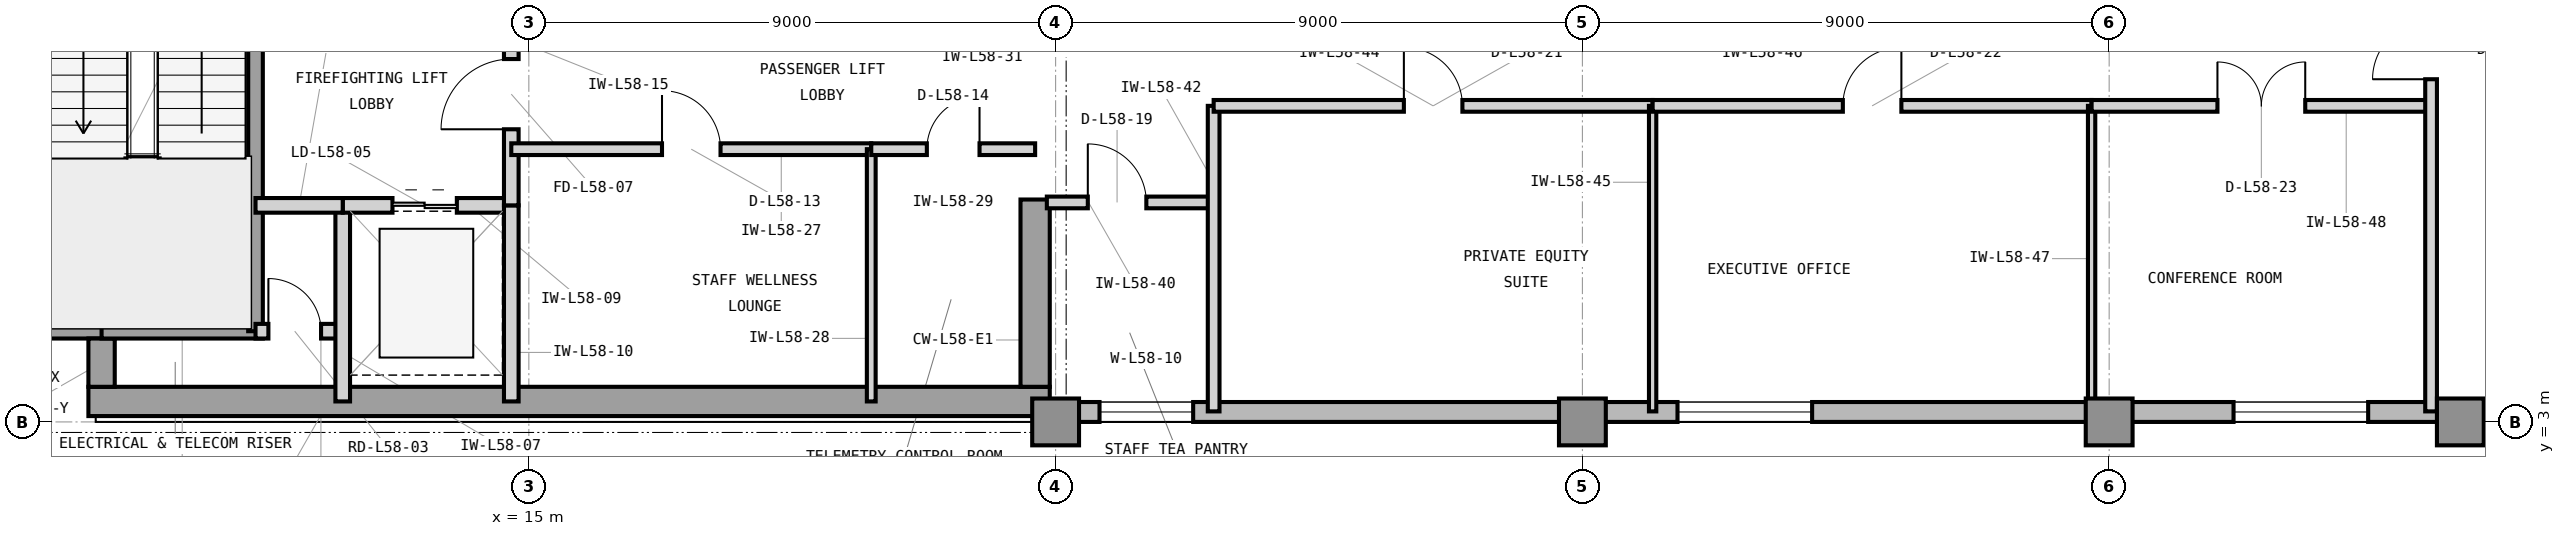
"""IFC4 building model, lengths in metres.
Left out: names, types, materials, properties, quantities, classifications, styles, units other than length and angle.
Written with IfcOpenShell. Run it as: python <this file> out.ifc"""

import sys

from ifc_helpers import new_model, si_unit, direction, frame, frame_2d, origin, origin_2d, place, context, subcontext, project, spatial, rectangle, extrude, element, fill, save


model = new_model("IFC4")
c1 = context("Model", 3, precision=1e-05, world=origin(), true_north=direction((0.0, 1.0)))
c2 = subcontext(c1, "Body", "Model", "MODEL_VIEW")
j1 = project(units=[si_unit("LENGTHUNIT", "METRE"), si_unit("PLANEANGLEUNIT", "RADIAN")], contexts=[c1])
p1 = place(None, origin())
s1 = spatial("IfcSite", under=j1, at=p1, CompositionType="ELEMENT")
p2 = place(p1, origin())
s2 = spatial("IfcBuilding", under=s1, at=p2, CompositionType="ELEMENT")
p3 = place(p2, frame((0.0, 0.0, 239.1)))
s3 = spatial("IfcBuildingStorey", under=s2, at=p3, CompositionType="ELEMENT", Elevation=239.1)
p4 = place(p3, frame((7.475, 3.35, 0.0), z_axis=(0.0, 0.0, 1.0), x_axis=(1.0, 0.0, 0.0)))
e1 = element("IfcWall", 1, at=p4, inside=s3, PredefinedType="SHEAR", context=c2, shape_type="SweptSolid", body=[
    extrude(rectangle(XDim=16.425, YDim=0.5, at=frame_2d((8.212, 0.0))), origin(), (0.0, 0.0, 1.0), 3.9),
])
p5 = place(p3, frame((23.65, 3.6, 0.0), z_axis=(0.0, 0.0, 1.0), x_axis=(0.0, 1.0, 0.0)))
e2 = element("IfcWall", 2, at=p5, inside=s3, PredefinedType="SHEAR", context=c2, shape_type="SweptSolid", body=[
    extrude(rectangle(XDim=3.2, YDim=0.5, at=frame_2d((1.6, 0.0))), origin(), (0.0, 0.0, 1.0), 3.9),
])
p6 = place(p3, frame((6.6, 4.65, 0.0), z_axis=(0.0, 0.0, 1.0), x_axis=(1.0, 0.0, 0.0)))
e3 = element("IfcWall", 3, at=p6, inside=s3, PredefinedType="SHEAR", context=c2, shape_type="SweptSolid", body=[
    extrude(rectangle(XDim=1.325, YDim=0.45, at=frame_2d((0.663, 0.0))), origin(), (0.0, 0.0, 1.0), 3.9),
])
p7 = place(p3, frame((7.7, 3.6, 0.0), z_axis=(0.0, 0.0, 1.0), x_axis=(0.0, 1.0, 0.0)))
e4 = element("IfcWall", 4, at=p7, inside=s3, PredefinedType="SHEAR", context=c2, shape_type="SweptSolid", body=[
    extrude(rectangle(XDim=0.825, YDim=0.45, at=frame_2d((0.413, 0.0))), origin(), (0.0, 0.0, 1.0), 3.9),
])
for number, where, z_axis, x_axis in (
    (5, (24.0, 3.0, 0.0), (0.0, 0.0, 1.0), (1.0, 0.0, 0.0)),
    (6, (33.0, 3.0, 0.0), (0.0, 0.0, 1.0), (1.0, 0.0, 0.0)),
    (7, (42.0, 3.0, 0.0), (0.0, 0.0, 1.0), (1.0, 0.0, 0.0)),
    (8, (48.0, 3.0, 0.0), (0.0, 0.0, 1.0), (1.0, 0.0, 0.0)),
):
    element("IfcColumn", number, at=place(p3, frame(where, z_axis=z_axis, x_axis=x_axis)), inside=s3, PredefinedType="COLUMN", context=c2, shape_type="SweptSolid", body=[
        extrude(rectangle(XDim=0.8, YDim=0.8, at=origin_2d()), origin(), (0.0, 0.0, 1.0), 3.9),
    ])
p8 = place(p3, frame((23.9, 3.17, 0.0), z_axis=(0.0, 0.0, 1.0), x_axis=(1.0, 0.0, 0.0)))
e9 = element("IfcWall", 9, at=p8, inside=s3, PredefinedType="STANDARD", context=c2, shape_type="SweptSolid", body=[
    extrude(rectangle(XDim=28.5, YDim=0.34, at=frame_2d((14.25, 0.0))), origin(), (0.0, 0.0, 1.0), 3.7),
])
p9 = place(p8, frame((10.725, 0.0, 0.9)))
e10 = element("IfcOpeningElement", 10, at=p9, cuts=e9, PredefinedType="OPENING", context=c2, shape_type="SweptSolid", body=[
    extrude(rectangle(XDim=2.3, YDim=2.2, at=frame_2d((1.15, 1.1))), frame((0.0, 0.18, 0.0), z_axis=(0.0, -1.0, 0.0), x_axis=(1.0, 0.0, 0.0)), (0.0, 0.0, 1.0), 0.36),
])
p10 = place(p8, frame((20.225, 0.0, 0.9)))
e11 = element("IfcOpeningElement", 11, at=p10, cuts=e9, PredefinedType="OPENING", context=c2, shape_type="SweptSolid", body=[
    extrude(rectangle(XDim=2.3, YDim=2.2, at=frame_2d((1.15, 1.1))), frame((0.0, 0.18, 0.0), z_axis=(0.0, -1.0, 0.0), x_axis=(1.0, 0.0, 0.0)), (0.0, 0.0, 1.0), 0.36),
])
p11 = place(p8, frame((0.85, 0.0, 0.9)))
e12 = element("IfcOpeningElement", 12, at=p11, cuts=e9, PredefinedType="OPENING", context=c2, shape_type="SweptSolid", body=[
    extrude(rectangle(XDim=1.6, YDim=2.2, at=frame_2d((0.8, 1.1))), frame((0.0, 0.18, 0.0), z_axis=(0.0, -1.0, 0.0), x_axis=(1.0, 0.0, 0.0)), (0.0, 0.0, 1.0), 0.36),
])
p12 = place(p3, frame((7.7, 4.55, 0.0), z_axis=(0.0, 0.0, 1.0), x_axis=(1.0, 0.0, 0.0)))
e13 = element("IfcWall", 13, at=p12, inside=s3, PredefinedType="SHEAR", context=c2, shape_type="SweptSolid", body=[
    extrude(rectangle(XDim=2.755, YDim=0.25, at=frame_2d((1.377, 0.0))), origin(), (0.0, 0.0, 1.0), 3.9),
])
p13 = place(p3, frame((10.33, 4.55, 0.0), z_axis=(0.0, 0.0, 1.0), x_axis=(0.0, 1.0, 0.0)))
e14 = element("IfcWall", 14, at=p13, inside=s3, PredefinedType="SHEAR", context=c2, shape_type="SweptSolid", body=[
    extrude(rectangle(XDim=7.45, YDim=0.25, at=frame_2d((3.725, 0.0))), origin(), (0.0, 0.0, 1.0), 3.9),
])
p14 = place(p13, frame((5.9, 0.0, 0.0)))
e15 = element("IfcOpeningElement", 15, at=p14, cuts=e14, PredefinedType="OPENING", context=c2, shape_type="SweptSolid", body=[
    extrude(rectangle(XDim=1.25, YDim=2.2, at=frame_2d((0.625, 1.1))), frame((0.0, 0.135, 0.0), z_axis=(0.0, -1.0, 0.0), x_axis=(1.0, 0.0, 0.0)), (0.0, 0.0, 1.0), 0.27),
])
p15 = place(p3, frame((10.33, 4.55, 0.0), z_axis=(0.0, 0.0, 1.0), x_axis=(1.0, 0.0, 0.0)))
e16 = element("IfcWall", 16, at=p15, inside=s3, PredefinedType="PARTITIONING", context=c2, shape_type="SweptSolid", body=[
    extrude(rectangle(XDim=1.49, YDim=0.25, at=frame_2d((0.745, 0.0))), origin(), (0.0, 0.0, 1.0), 3.69),
])
p16 = place(p15, frame((0.22, 0.0, 0.0)))
e17 = element("IfcOpeningElement", 17, at=p16, cuts=e16, PredefinedType="OPENING", context=c2, shape_type="SweptSolid", body=[
    extrude(rectangle(XDim=0.9, YDim=2.1, at=frame_2d((0.45, 1.05))), frame((0.0, 0.135, 0.0), z_axis=(0.0, -1.0, 0.0), x_axis=(1.0, 0.0, 0.0)), (0.0, 0.0, 1.0), 0.27),
])
p17 = place(p3, frame((11.82, 3.35, 0.0), z_axis=(0.0, 0.0, 1.0), x_axis=(0.0, 1.0, 0.0)))
e18 = element("IfcWall", 18, at=p17, inside=s3, PredefinedType="PARTITIONING", context=c2, shape_type="SweptSolid", body=[
    extrude(rectangle(XDim=3.35, YDim=0.25, at=frame_2d((1.675, 0.0))), origin(), (0.0, 0.0, 1.0), 3.69),
])
p18 = place(p3, frame((11.82, 6.7, 0.0), z_axis=(0.0, 0.0, 1.0), x_axis=(1.0, 0.0, 0.0)))
e19 = element("IfcWall", 19, at=p18, inside=s3, PredefinedType="PARTITIONING", context=c2, shape_type="SweptSolid", body=[
    extrude(rectangle(XDim=2.88, YDim=0.25, at=frame_2d((1.44, 0.0))), origin(), (0.0, 0.0, 1.0), 3.073),
])
p19 = place(p18, frame((0.85, 0.0, 0.0)))
e20 = element("IfcOpeningElement", 20, at=p19, cuts=e19, PredefinedType="OPENING", context=c2, shape_type="SweptSolid", body=[
    extrude(rectangle(XDim=1.1, YDim=2.25, at=frame_2d((0.55, 1.125))), frame((0.0, 0.135, 0.0), z_axis=(0.0, -1.0, 0.0), x_axis=(1.0, 0.0, 0.0)), (0.0, 0.0, 1.0), 0.27),
])
p20 = place(p3, frame((14.7, 3.35, 0.0), z_axis=(0.0, 0.0, 1.0), x_axis=(0.0, 1.0, 0.0)))
e21 = element("IfcWall", 21, at=p20, inside=s3, PredefinedType="PARTITIONING", context=c2, shape_type="SweptSolid", body=[
    extrude(rectangle(XDim=3.35, YDim=0.25, at=frame_2d((1.675, 0.0))), origin(), (0.0, 0.0, 1.0), 3.69),
])
p21 = place(p3, frame((14.7, 6.7, 0.0), z_axis=(0.0, 0.0, 1.0), x_axis=(0.0, 1.0, 0.0)))
e22 = element("IfcWall", 22, at=p21, inside=s3, PredefinedType="PARTITIONING", context=c2, shape_type="SweptSolid", body=[
    extrude(rectangle(XDim=3.8, YDim=0.25, at=frame_2d((1.9, 0.0))), origin(), (0.0, 0.0, 1.0), 3.69),
])
p22 = place(p21, frame((1.3, 0.0, 0.0)))
e23 = element("IfcOpeningElement", 23, at=p22, cuts=e22, PredefinedType="OPENING", context=c2, shape_type="SweptSolid", body=[
    extrude(rectangle(XDim=1.2, YDim=2.2, at=frame_2d((0.6, 1.1))), frame((0.0, 0.135, 0.0), z_axis=(0.0, -1.0, 0.0), x_axis=(1.0, 0.0, 0.0)), (0.0, 0.0, 1.0), 0.27),
])
p23 = place(p3, frame((10.33, 6.7, 0.0), z_axis=(0.0, 0.0, 1.0), x_axis=(1.0, 0.0, 0.0)))
e24 = element("IfcWall", 24, at=p23, inside=s3, PredefinedType="PARTITIONING", context=c2, shape_type="SweptSolid", body=[
    extrude(rectangle(XDim=1.49, YDim=0.25, at=frame_2d((0.745, 0.0))), origin(), (0.0, 0.0, 1.0), 3.073),
])
p24 = place(p3, frame((14.7, 7.66, 0.0), z_axis=(0.0, 0.0, 1.0), x_axis=(1.0, 0.0, 0.0)))
e25 = element("IfcWall", 25, at=p24, inside=s3, PredefinedType="PARTITIONING", context=c2, shape_type="SweptSolid", body=[
    extrude(rectangle(XDim=6.15, YDim=0.2, at=frame_2d((3.075, 0.0))), origin(), (0.0, 0.0, 1.0), 3.69),
])
p25 = place(p24, frame((2.575, 0.0, 0.0)))
e26 = element("IfcOpeningElement", 26, at=p25, cuts=e25, PredefinedType="OPENING", context=c2, shape_type="SweptSolid", body=[
    extrude(rectangle(XDim=1.0, YDim=2.15, at=frame_2d((0.5, 1.075))), frame((0.0, 0.11, 0.0), z_axis=(0.0, -1.0, 0.0), x_axis=(1.0, 0.0, 0.0)), (0.0, 0.0, 1.0), 0.22),
])
p26 = place(p3, frame((20.85, 3.35, 0.0), z_axis=(0.0, 0.0, 1.0), x_axis=(0.0, 1.0, 0.0)))
e27 = element("IfcWall", 27, at=p26, inside=s3, PredefinedType="PARTITIONING", context=c2, shape_type="SweptSolid", body=[
    extrude(rectangle(XDim=4.31, YDim=0.15, at=frame_2d((2.155, 0.0))), origin(), (0.0, 0.0, 1.0), 3.69),
])
p27 = place(p3, frame((20.85, 7.66, 0.0), z_axis=(0.0, 0.0, 1.0), x_axis=(1.0, 0.0, 0.0)))
e28 = element("IfcWall", 28, at=p27, inside=s3, PredefinedType="PARTITIONING", context=c2, shape_type="SweptSolid", body=[
    extrude(rectangle(XDim=2.8, YDim=0.2, at=frame_2d((1.4, 0.0))), origin(), (0.0, 0.0, 1.0), 3.69),
])
p28 = place(p27, frame((0.95, 0.0, 0.0)))
e29 = element("IfcOpeningElement", 29, at=p28, cuts=e28, PredefinedType="OPENING", context=c2, shape_type="SweptSolid", body=[
    extrude(rectangle(XDim=0.9, YDim=2.1, at=frame_2d((0.45, 1.05))), frame((0.0, 0.11, 0.0), z_axis=(0.0, -1.0, 0.0), x_axis=(1.0, 0.0, 0.0)), (0.0, 0.0, 1.0), 0.22),
])
p29 = place(p3, frame((23.85, 6.75, 0.0), z_axis=(0.0, 0.0, 1.0), x_axis=(1.0, 0.0, 0.0)))
e30 = element("IfcWall", 30, at=p29, inside=s3, PredefinedType="PARTITIONING", context=c2, shape_type="SweptSolid", body=[
    extrude(rectangle(XDim=2.85, YDim=0.2, at=frame_2d((1.425, 0.0))), origin(), (0.0, 0.0, 1.0), 3.69),
])
p30 = place(p29, frame((0.7, 0.0, 0.0)))
e31 = element("IfcOpeningElement", 31, at=p30, cuts=e30, PredefinedType="OPENING", context=c2, shape_type="SweptSolid", body=[
    extrude(rectangle(XDim=1.0, YDim=2.15, at=frame_2d((0.5, 1.075))), frame((0.0, 0.11, 0.0), z_axis=(0.0, -1.0, 0.0), x_axis=(1.0, 0.0, 0.0)), (0.0, 0.0, 1.0), 0.22),
])
p31 = place(p3, frame((26.7, 3.18, 0.0), z_axis=(0.0, 0.0, 1.0), x_axis=(0.0, 1.0, 0.0)))
e32 = element("IfcWall", 32, at=p31, inside=s3, PredefinedType="PARTITIONING", context=c2, shape_type="SweptSolid", body=[
    extrude(rectangle(XDim=5.22, YDim=0.2, at=frame_2d((2.61, 0.0))), origin(), (0.0, 0.0, 1.0), 3.69),
])
p32 = place(p3, frame((26.7, 8.4, 0.0), z_axis=(0.0, 0.0, 1.0), x_axis=(1.0, 0.0, 0.0)))
e33 = element("IfcWall", 33, at=p32, inside=s3, PredefinedType="PARTITIONING", context=c2, shape_type="SweptSolid", body=[
    extrude(rectangle(XDim=7.5, YDim=0.2, at=frame_2d((3.75, 0.0))), origin(), (0.0, 0.0, 1.0), 3.69),
])
p33 = place(p32, frame((3.25, 0.0, 0.0)))
e34 = element("IfcOpeningElement", 34, at=p33, cuts=e33, PredefinedType="OPENING", context=c2, shape_type="SweptSolid", body=[
    extrude(rectangle(XDim=1.0, YDim=2.15, at=frame_2d((0.5, 1.075))), frame((0.0, 0.11, 0.0), z_axis=(0.0, -1.0, 0.0), x_axis=(1.0, 0.0, 0.0)), (0.0, 0.0, 1.0), 0.22),
])
p34 = place(p3, frame((34.2, 3.18, 0.0), z_axis=(0.0, 0.0, 1.0), x_axis=(0.0, 1.0, 0.0)))
e35 = element("IfcWall", 35, at=p34, inside=s3, PredefinedType="PARTITIONING", context=c2, shape_type="SweptSolid", body=[
    extrude(rectangle(XDim=5.22, YDim=0.125, at=frame_2d((2.61, 0.0))), origin(), (0.0, 0.0, 1.0), 3.69),
])
p35 = place(p3, frame((34.2, 8.4, 0.0), z_axis=(0.0, 0.0, 1.0), x_axis=(1.0, 0.0, 0.0)))
e36 = element("IfcWall", 36, at=p35, inside=s3, PredefinedType="PARTITIONING", context=c2, shape_type="SweptSolid", body=[
    extrude(rectangle(XDim=7.5, YDim=0.2, at=frame_2d((3.75, 0.0))), origin(), (0.0, 0.0, 1.0), 3.69),
])
p36 = place(p35, frame((3.25, 0.0, 0.0)))
e37 = element("IfcOpeningElement", 37, at=p36, cuts=e36, PredefinedType="OPENING", context=c2, shape_type="SweptSolid", body=[
    extrude(rectangle(XDim=1.0, YDim=2.15, at=frame_2d((0.5, 1.075))), frame((0.0, 0.11, 0.0), z_axis=(0.0, -1.0, 0.0), x_axis=(1.0, 0.0, 0.0)), (0.0, 0.0, 1.0), 0.22),
])
p37 = place(p3, frame((41.7, 3.18, 0.0), z_axis=(0.0, 0.0, 1.0), x_axis=(0.0, 1.0, 0.0)))
e38 = element("IfcWall", 38, at=p37, inside=s3, PredefinedType="PARTITIONING", context=c2, shape_type="SweptSolid", body=[
    extrude(rectangle(XDim=5.22, YDim=0.125, at=frame_2d((2.61, 0.0))), origin(), (0.0, 0.0, 1.0), 3.69),
])
p38 = place(p3, frame((41.7, 8.4, 0.0), z_axis=(0.0, 0.0, 1.0), x_axis=(1.0, 0.0, 0.0)))
e39 = element("IfcWall", 39, at=p38, inside=s3, PredefinedType="PARTITIONING", context=c2, shape_type="SweptSolid", body=[
    extrude(rectangle(XDim=5.8, YDim=0.2, at=frame_2d((2.9, 0.0))), origin(), (0.0, 0.0, 1.0), 3.69),
])
p39 = place(p38, frame((2.15, 0.0, 0.0)))
e40 = element("IfcOpeningElement", 40, at=p39, cuts=e39, PredefinedType="OPENING", context=c2, shape_type="SweptSolid", body=[
    extrude(rectangle(XDim=1.5, YDim=2.3, at=frame_2d((0.75, 1.15))), frame((0.0, 0.11, 0.0), z_axis=(0.0, -1.0, 0.0), x_axis=(1.0, 0.0, 0.0)), (0.0, 0.0, 1.0), 0.22),
])
p40 = place(p3, frame((47.5, 3.18, 0.0), z_axis=(0.0, 0.0, 1.0), x_axis=(0.0, 1.0, 0.0)))
e41 = element("IfcWall", 41, at=p40, inside=s3, PredefinedType="PARTITIONING", context=c2, shape_type="SweptSolid", body=[
    extrude(rectangle(XDim=17.64, YDim=0.2, at=frame_2d((8.82, 0.0))), origin(), (0.0, 0.0, 1.0), 3.69),
])
p41 = place(p40, frame((5.675, 0.0, 0.0)))
e42 = element("IfcOpeningElement", 42, at=p41, cuts=e41, PredefinedType="OPENING", context=c2, shape_type="SweptSolid", body=[
    extrude(rectangle(XDim=1.0, YDim=2.15, at=frame_2d((0.5, 1.075))), frame((0.0, 0.11, 0.0), z_axis=(0.0, -1.0, 0.0), x_axis=(1.0, 0.0, 0.0)), (0.0, 0.0, 1.0), 0.22),
])
p42 = place(p9, origin())
e43 = element("IfcWindow", 43, at=p42, inside=s3, PartitioningType="SINGLE_PANEL", PredefinedType="WINDOW", context=c2, shape_type="SweptSolid", body=[
    extrude(rectangle(XDim=2.3, YDim=2.2, at=frame_2d((1.15, 1.1))), frame((0.0, 0.11, 0.0), z_axis=(0.0, -1.0, 0.0), x_axis=(1.0, 0.0, 0.0)), (0.0, 0.0, 1.0), 0.06),
])
fill(e10, e43)
p43 = place(p10, origin())
e44 = element("IfcWindow", 44, at=p43, inside=s3, PartitioningType="SINGLE_PANEL", PredefinedType="WINDOW", context=c2, shape_type="SweptSolid", body=[
    extrude(rectangle(XDim=2.3, YDim=2.2, at=frame_2d((1.15, 1.1))), frame((0.0, 0.11, 0.0), z_axis=(0.0, -1.0, 0.0), x_axis=(1.0, 0.0, 0.0)), (0.0, 0.0, 1.0), 0.06),
])
fill(e11, e44)
p44 = place(p16, origin())
e45 = element("IfcDoor", 45, at=p44, inside=s3, OperationType="SINGLE_SWING_LEFT", PredefinedType="TRAPDOOR", context=c2, shape_type="SweptSolid", body=[
    extrude(rectangle(XDim=0.9, YDim=2.1, at=frame_2d((0.45, 1.05))), frame((0.0, 0.025, 0.0), z_axis=(0.0, -1.0, 0.0), x_axis=(1.0, 0.0, 0.0)), (0.0, 0.0, 1.0), 0.05),
])
fill(e17, e45)
p45 = place(p19, origin())
e46 = element("IfcDoor", 46, at=p45, inside=s3, OperationType="DOUBLE_DOOR_SLIDING", PredefinedType="DOOR", context=c2, shape_type="SweptSolid", body=[
    extrude(rectangle(XDim=1.1, YDim=2.25, at=frame_2d((0.55, 1.125))), frame((0.0, 0.025, 0.0), z_axis=(0.0, -1.0, 0.0), x_axis=(1.0, 0.0, 0.0)), (0.0, 0.0, 1.0), 0.05),
])
fill(e20, e46)
p46 = place(p22, origin())
e47 = element("IfcDoor", 47, at=p46, inside=s3, OperationType="SINGLE_SWING_LEFT", PredefinedType="DOOR", context=c2, shape_type="SweptSolid", body=[
    extrude(rectangle(XDim=1.2, YDim=2.2, at=frame_2d((0.6, 1.1))), frame((0.0, 0.025, 0.0), z_axis=(0.0, -1.0, 0.0), x_axis=(1.0, 0.0, 0.0)), (0.0, 0.0, 1.0), 0.05),
])
fill(e23, e47)
p47 = place(p25, origin())
e48 = element("IfcDoor", 48, at=p47, inside=s3, OperationType="SINGLE_SWING_LEFT", PredefinedType="DOOR", context=c2, shape_type="SweptSolid", body=[
    extrude(rectangle(XDim=1.0, YDim=2.15, at=frame_2d((0.5, 1.075))), frame((0.0, 0.025, 0.0), z_axis=(0.0, -1.0, 0.0), x_axis=(1.0, 0.0, 0.0)), (0.0, 0.0, 1.0), 0.05),
])
fill(e26, e48)
p48 = place(p28, origin())
e49 = element("IfcDoor", 49, at=p48, inside=s3, OperationType="SINGLE_SWING_RIGHT", PredefinedType="TRAPDOOR", context=c2, shape_type="SweptSolid", body=[
    extrude(rectangle(XDim=0.9, YDim=2.1, at=frame_2d((0.45, 1.05))), frame((0.0, 0.025, 0.0), z_axis=(0.0, -1.0, 0.0), x_axis=(1.0, 0.0, 0.0)), (0.0, 0.0, 1.0), 0.05),
])
fill(e29, e49)
p49 = place(p30, origin())
e50 = element("IfcDoor", 50, at=p49, inside=s3, OperationType="SINGLE_SWING_LEFT", PredefinedType="DOOR", context=c2, shape_type="SweptSolid", body=[
    extrude(rectangle(XDim=1.0, YDim=2.15, at=frame_2d((0.5, 1.075))), frame((0.0, 0.025, 0.0), z_axis=(0.0, -1.0, 0.0), x_axis=(1.0, 0.0, 0.0)), (0.0, 0.0, 1.0), 0.05),
])
fill(e31, e50)
p50 = place(p33, origin())
e51 = element("IfcDoor", 51, at=p50, inside=s3, OperationType="SINGLE_SWING_LEFT", PredefinedType="DOOR", context=c2, shape_type="SweptSolid", body=[
    extrude(rectangle(XDim=1.0, YDim=2.15, at=frame_2d((0.5, 1.075))), frame((0.0, 0.025, 0.0), z_axis=(0.0, -1.0, 0.0), x_axis=(1.0, 0.0, 0.0)), (0.0, 0.0, 1.0), 0.05),
])
fill(e34, e51)
p51 = place(p36, origin())
e52 = element("IfcDoor", 52, at=p51, inside=s3, OperationType="SINGLE_SWING_RIGHT", PredefinedType="DOOR", context=c2, shape_type="SweptSolid", body=[
    extrude(rectangle(XDim=1.0, YDim=2.15, at=frame_2d((0.5, 1.075))), frame((0.0, 0.025, 0.0), z_axis=(0.0, -1.0, 0.0), x_axis=(1.0, 0.0, 0.0)), (0.0, 0.0, 1.0), 0.05),
])
fill(e37, e52)
p52 = place(p39, origin())
e53 = element("IfcDoor", 53, at=p52, inside=s3, OperationType="DOUBLE_DOOR_SINGLE_SWING", PredefinedType="DOOR", context=c2, shape_type="SweptSolid", body=[
    extrude(rectangle(XDim=1.5, YDim=2.3, at=frame_2d((0.75, 1.15))), frame((0.0, 0.025, 0.0), z_axis=(0.0, -1.0, 0.0), x_axis=(1.0, 0.0, 0.0)), (0.0, 0.0, 1.0), 0.05),
])
fill(e40, e53)
p53 = place(p41, origin())
e54 = element("IfcDoor", 54, at=p53, inside=s3, OperationType="SINGLE_SWING_LEFT", PredefinedType="DOOR", context=c2, shape_type="SweptSolid", body=[
    extrude(rectangle(XDim=1.0, YDim=2.15, at=frame_2d((0.5, 1.075))), frame((0.0, 0.025, 0.0), z_axis=(0.0, -1.0, 0.0), x_axis=(1.0, 0.0, 0.0)), (0.0, 0.0, 1.0), 0.05),
])
fill(e42, e54)
p54 = place(p11, origin())
e55 = element("IfcWindow", 55, at=p54, inside=s3, PartitioningType="SINGLE_PANEL", PredefinedType="WINDOW", context=c2, shape_type="SweptSolid", body=[
    extrude(rectangle(XDim=1.6, YDim=2.2, at=frame_2d((0.8, 1.1))), frame((0.0, 0.11, 0.0), z_axis=(0.0, -1.0, 0.0), x_axis=(1.0, 0.0, 0.0)), (0.0, 0.0, 1.0), 0.06),
])
fill(e12, e55)
save(model, sys.argv[1])
